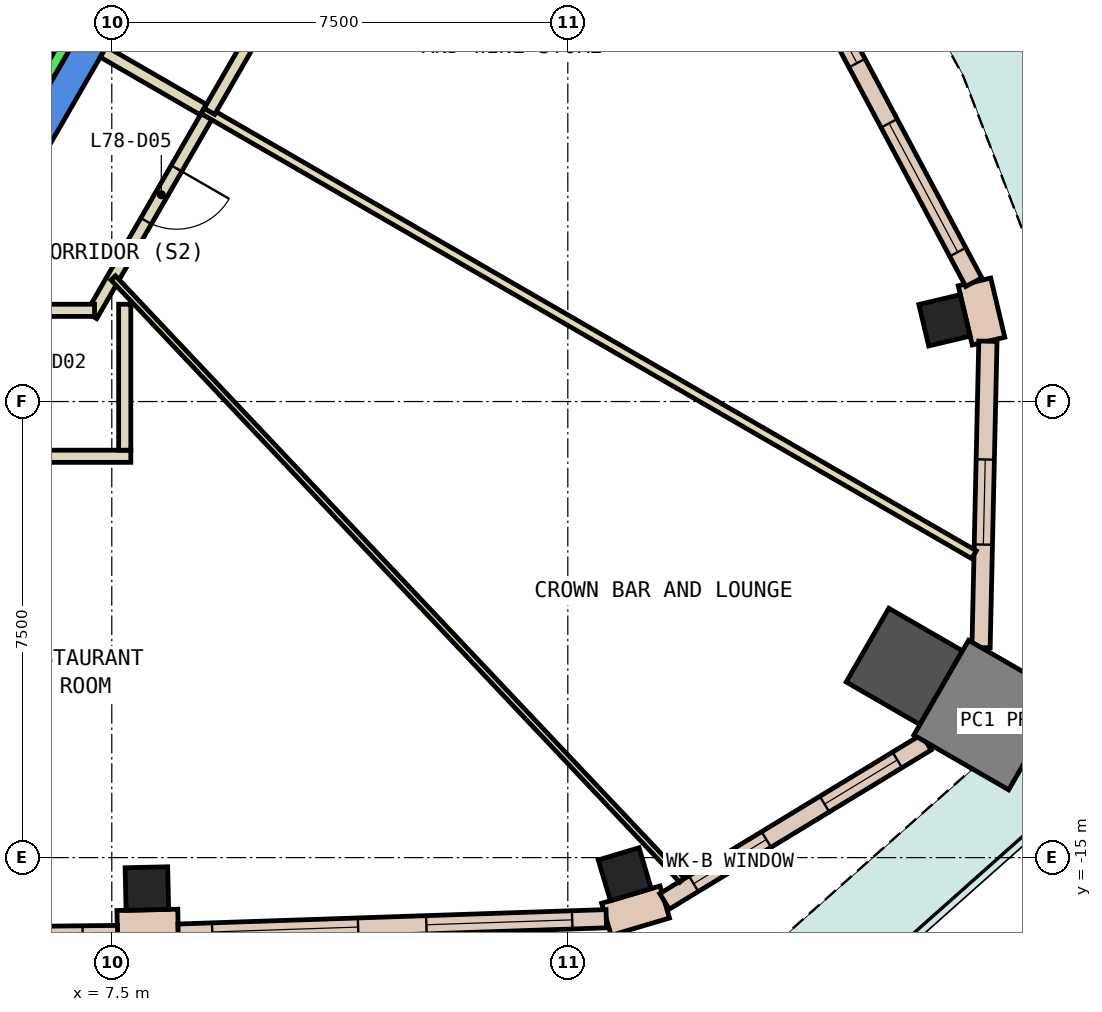
"""IFC4 building model, lengths in metres.
Left out: names, types, materials, properties, quantities, classifications, styles, units other than length and angle.
Written with IfcOpenShell. Run it as: python <this file> out.ifc"""

import sys

from ifc_helpers import new_model, si_unit, direction, frame, frame_2d, origin, origin_2d, place, context, subcontext, project, spatial, polyline, rectangle, outline, extrude, element, fill, save


model = new_model("IFC4")
c1 = context("Model", 3, precision=1e-05, world=origin(), true_north=direction((0.0, 1.0)))
c2 = subcontext(c1, "Body", "Model", "MODEL_VIEW")
j1 = project(units=[si_unit("LENGTHUNIT", "METRE"), si_unit("PLANEANGLEUNIT", "RADIAN")], contexts=[c1])
p1 = place(None, origin())
s1 = spatial("IfcSite", under=j1, at=p1, CompositionType="ELEMENT")
p2 = place(p1, origin())
s2 = spatial("IfcBuilding", under=s1, at=p2, CompositionType="ELEMENT")
p3 = place(p2, frame((0.0, 0.0, 331.4)))
s3 = spatial("IfcBuildingStorey", under=s2, at=p3, CompositionType="ELEMENT", Elevation=331.4)
for number, where, z_axis, x_axis in (
    (1, (8.077, -15.509, 0.0), (0.0, 0.0, 1.0), (1.0, 0.022, 0.0)),
    (2, (15.936, -15.274, 0.0), (0.0, 0.0, 1.0), (0.958, 0.286, 0.0)),
):
    element("IfcColumn", number, at=place(p3, frame(where, z_axis=z_axis, x_axis=x_axis)), inside=s3, PredefinedType="COLUMN", context=c2, shape_type="SweptSolid", body=[
        extrude(rectangle(XDim=0.7, YDim=0.7, at=origin_2d()), origin(), (0.0, 0.0, 1.0), 4.15),
    ])
p4 = place(p3, frame((20.535, -11.856, 0.0), z_axis=(0.0, 0.0, 1.0), x_axis=(-0.866025403784, 0.5, 0.0)))
e3 = element("IfcColumn", 3, at=p4, inside=s3, PredefinedType="COLUMN", context=c2, shape_type="SweptSolid", body=[
    extrude(rectangle(XDim=1.4, YDim=1.4, at=origin_2d()), origin(), (0.0, 0.0, 1.0), 4.15),
])
p5 = place(p3, frame((21.195, -6.164, 0.0), z_axis=(0.0, 0.0, 1.0), x_axis=(-0.2316120761, 0.972808226839, 0.0)))
e4 = element("IfcColumn", 4, at=p5, inside=s3, PredefinedType="COLUMN", context=c2, shape_type="SweptSolid", body=[
    extrude(rectangle(XDim=0.7, YDim=0.7, at=origin_2d()), origin(), (0.0, 0.0, 1.0), 4.15),
])
p6 = place(p3, frame((21.921, -12.656, 0.0), z_axis=(0.0, 0.0, 1.0), x_axis=(-0.866025403784, 0.5, 0.0)))
e5 = element("IfcColumn", 5, at=p6, inside=s3, PredefinedType="COLUMN", context=c2, shape_type="SweptSolid", body=[
    extrude(rectangle(XDim=1.8, YDim=1.8, at=origin_2d()), origin(), (0.0, 0.0, 1.0), 4.15),
])
p7 = place(p3, frame((0.0, 0.0, -0.45)))
e6 = element("IfcWall", 6, at=p7, inside=s3, PredefinedType="SHEAR", context=c2, shape_type="SweptSolid", body=[
    extrude(outline(polyline([(4.907, -6.0), (9.815, 2.5), (9.238, 2.5), (4.619, -5.5), (4.907, -6.0)])), origin(), (0.0, 0.0, 1.0), 4.6),
])
for number, where, z_axis, x_axis in (
    (7, (21.919, -6.506, 0.0), (0.0, 0.0, 1.0), (-0.231, 0.973, 0.0)),
    (8, (7.591, -16.145, 0.0), (0.0, 0.0, 1.0), (1.0, 0.022, 0.0)),
):
    element("IfcWall", number, at=place(p3, frame(where, z_axis=z_axis, x_axis=x_axis)), inside=s3, PredefinedType="STANDARD", context=c2, shape_type="SweptSolid", body=[
        extrude(rectangle(XDim=1.0, YDim=0.55, at=frame_2d((0.5, 0.0))), origin(), (0.0, 0.0, 1.0), 4.15),
    ])
p8 = place(p3, frame((15.635, -16.015, 0.0), z_axis=(0.0, 0.0, 1.0), x_axis=(0.958588587629, 0.284794521834, 0.0)))
e9 = element("IfcWall", 9, at=p8, inside=s3, PredefinedType="STANDARD", context=c2, shape_type="SweptSolid", body=[
    extrude(rectangle(XDim=1.0, YDim=0.55, at=frame_2d((0.5, 0.0))), origin(), (0.0, 0.0, 1.0), 4.15),
])
p9 = place(p3, frame((0.499, -16.344, 0.0), z_axis=(0.0, 0.0, 1.0), x_axis=(0.999937873213, 0.011146735624, 0.0)))
e10 = element("IfcWall", 10, at=p9, inside=s3, PredefinedType="STANDARD", context=c2, shape_type="SweptSolid", body=[
    extrude(rectangle(XDim=7.096, YDim=0.3, at=frame_2d((3.548, 0.0))), origin(), (0.0, 0.0, 1.0), 4.15),
])
p10 = place(p9, frame((0.574, 0.0, 0.9)))
e11 = element("IfcOpeningElement", 11, at=p10, cuts=e10, PredefinedType="OPENING", context=c2, shape_type="SweptSolid", body=[
    extrude(rectangle(XDim=2.4, YDim=3.0, at=frame_2d((1.2, 1.5))), frame((0.0, 0.16, 0.0), z_axis=(0.0, -1.0, 0.0), x_axis=(1.0, 0.0, 0.0)), (0.0, 0.0, 1.0), 0.32),
])
p11 = place(p9, frame((4.122, 0.0, 0.9)))
e12 = element("IfcOpeningElement", 12, at=p11, cuts=e10, PredefinedType="OPENING", context=c2, shape_type="SweptSolid", body=[
    extrude(rectangle(XDim=2.4, YDim=3.0, at=frame_2d((1.2, 1.5))), frame((0.0, 0.16, 0.0), z_axis=(0.0, -1.0, 0.0), x_axis=(1.0, 0.0, 0.0)), (0.0, 0.0, 1.0), 0.32),
])
p12 = place(p3, frame((8.592, -16.242, 0.0), z_axis=(0.0, 0.0, 1.0), x_axis=(0.999433696929, 0.033649449366, 0.0)))
e13 = element("IfcWall", 13, at=p12, inside=s3, PredefinedType="STANDARD", context=c2, shape_type="SweptSolid", body=[
    extrude(rectangle(XDim=7.045, YDim=0.3, at=frame_2d((3.522, 0.0))), origin(), (0.0, 0.0, 1.0), 4.15),
])
p13 = place(p12, frame((0.561, 0.0, 0.9)))
e14 = element("IfcOpeningElement", 14, at=p13, cuts=e13, PredefinedType="OPENING", context=c2, shape_type="SweptSolid", body=[
    extrude(rectangle(XDim=2.4, YDim=3.0, at=frame_2d((1.2, 1.5))), frame((0.0, 0.16, 0.0), z_axis=(0.0, -1.0, 0.0), x_axis=(1.0, 0.0, 0.0)), (0.0, 0.0, 1.0), 0.32),
])
p14 = place(p12, frame((4.084, 0.0, 0.9)))
e15 = element("IfcOpeningElement", 15, at=p14, cuts=e13, PredefinedType="OPENING", context=c2, shape_type="SweptSolid", body=[
    extrude(rectangle(XDim=2.4, YDim=3.0, at=frame_2d((1.2, 1.5))), frame((0.0, 0.16, 0.0), z_axis=(0.0, -1.0, 0.0), x_axis=(1.0, 0.0, 0.0)), (0.0, 0.0, 1.0), 0.32),
])
p15 = place(p3, frame((16.59, -15.72, 0.0), z_axis=(0.0, 0.0, 1.0), x_axis=(0.854607095238, 0.519275180197, 0.0)))
e16 = element("IfcWall", 16, at=p15, inside=s3, PredefinedType="STANDARD", context=c2, shape_type="SweptSolid", body=[
    extrude(rectangle(XDim=5.04, YDim=0.3, at=frame_2d((2.52, 0.0))), origin(), (0.0, 0.0, 1.0), 4.15),
])
p16 = place(p15, frame((0.56, 0.0, 0.9)))
e17 = element("IfcOpeningElement", 17, at=p16, cuts=e16, PredefinedType="OPENING", context=c2, shape_type="SweptSolid", body=[
    extrude(rectangle(XDim=1.4, YDim=3.0, at=frame_2d((0.7, 1.5))), frame((0.0, 0.16, 0.0), z_axis=(0.0, -1.0, 0.0), x_axis=(1.0, 0.0, 0.0)), (0.0, 0.0, 1.0), 0.32),
])
p17 = place(p15, frame((3.08, 0.0, 0.9)))
e18 = element("IfcOpeningElement", 18, at=p17, cuts=e16, PredefinedType="OPENING", context=c2, shape_type="SweptSolid", body=[
    extrude(rectangle(XDim=1.4, YDim=3.0, at=frame_2d((0.7, 1.5))), frame((0.0, 0.16, 0.0), z_axis=(0.0, -1.0, 0.0), x_axis=(1.0, 0.0, 0.0)), (0.0, 0.0, 1.0), 0.32),
])
p18 = place(p3, frame((21.796, -11.546, 0.0), z_axis=(0.0, 0.0, 1.0), x_axis=(0.022431960078, 0.999748371925, 0.0)))
e19 = element("IfcWall", 19, at=p18, inside=s3, PredefinedType="STANDARD", context=c2, shape_type="SweptSolid", body=[
    extrude(rectangle(XDim=5.039, YDim=0.3, at=frame_2d((2.52, 0.0))), origin(), (0.0, 0.0, 1.0), 4.15),
])
p19 = place(p18, frame((1.694, 0.0, 0.9)))
e20 = element("IfcOpeningElement", 20, at=p19, cuts=e19, PredefinedType="OPENING", context=c2, shape_type="SweptSolid", body=[
    extrude(rectangle(XDim=1.4, YDim=3.0, at=frame_2d((0.7, 1.5))), frame((0.0, 0.16, 0.0), z_axis=(0.0, -1.0, 0.0), x_axis=(1.0, 0.0, 0.0)), (0.0, 0.0, 1.0), 0.32),
])
p20 = place(p3, frame((21.677, -5.537, 0.0), z_axis=(0.0, 0.0, 1.0), x_axis=(-0.470447918342, 0.882427762555, 0.0)))
e21 = element("IfcWall", 21, at=p20, inside=s3, PredefinedType="STANDARD", context=c2, shape_type="SweptSolid", body=[
    extrude(rectangle(XDim=7.044, YDim=0.3, at=frame_2d((3.522, 0.0))), origin(), (0.0, 0.0, 1.0), 4.15),
])
p21 = place(p20, frame((0.561, 0.0, 0.9)))
e22 = element("IfcOpeningElement", 22, at=p21, cuts=e21, PredefinedType="OPENING", context=c2, shape_type="SweptSolid", body=[
    extrude(rectangle(XDim=2.4, YDim=3.0, at=frame_2d((1.2, 1.5))), frame((0.0, 0.16, 0.0), z_axis=(0.0, -1.0, 0.0), x_axis=(1.0, 0.0, 0.0)), (0.0, 0.0, 1.0), 0.32),
])
p22 = place(p20, frame((4.083, 0.0, 0.9)))
e23 = element("IfcOpeningElement", 23, at=p22, cuts=e21, PredefinedType="OPENING", context=c2, shape_type="SweptSolid", body=[
    extrude(rectangle(XDim=2.4, YDim=3.0, at=frame_2d((1.2, 1.5))), frame((0.0, 0.16, 0.0), z_axis=(0.0, -1.0, 0.0), x_axis=(1.0, 0.0, 0.0)), (0.0, 0.0, 1.0), 0.32),
])
p23 = place(p3, frame((7.813, -8.4, 0.0), z_axis=(0.0, 0.0, 1.0), x_axis=(-1.0, 0.0, 0.0)))
e24 = element("IfcWall", 24, at=p23, inside=s3, PredefinedType="PARTITIONING", context=c2, shape_type="SweptSolid", body=[
    extrude(rectangle(XDim=5.671, YDim=0.2, at=frame_2d((2.835, 0.0))), origin(), (0.0, 0.0, 1.0), 4.15),
])
p24 = place(p23, frame((2.441, 0.0, 0.0)))
e25 = element("IfcOpeningElement", 25, at=p24, cuts=e24, PredefinedType="OPENING", context=c2, shape_type="SweptSolid", body=[
    extrude(rectangle(XDim=1.0, YDim=2.1, at=frame_2d((0.5, 1.05))), frame((0.0, 0.11, 0.0), z_axis=(0.0, -1.0, 0.0), x_axis=(1.0, 0.0, 0.0)), (0.0, 0.0, 1.0), 0.22),
])
p25 = place(p3, frame((7.713, -5.9, 0.0), z_axis=(0.0, 0.0, 1.0), x_axis=(0.0, -1.0, 0.0)))
e26 = element("IfcWall", 26, at=p25, inside=s3, PredefinedType="PARTITIONING", context=c2, shape_type="SweptSolid", body=[
    extrude(rectangle(XDim=2.4, YDim=0.2, at=frame_2d((1.2, 0.0))), origin(), (0.0, 0.0, 1.0), 4.15),
])
p26 = place(p3, frame((9.106, -2.728, 0.0), z_axis=(0.0, 0.0, 1.0), x_axis=(-0.500132879116, -0.865948672398, 0.0)))
e27 = element("IfcWall", 27, at=p26, inside=s3, PredefinedType="PARTITIONING", context=c2, shape_type="SweptSolid", body=[
    extrude(rectangle(XDim=3.879, YDim=0.2, at=frame_2d((1.939, 0.0))), origin(), (0.0, 0.0, 1.0), 4.15),
])
p27 = place(p26, frame((1.083, 0.0, 0.0)))
e28 = element("IfcOpeningElement", 28, at=p27, cuts=e27, PredefinedType="OPENING", context=c2, shape_type="SweptSolid", body=[
    extrude(rectangle(XDim=1.0, YDim=2.1, at=frame_2d((0.5, 1.05))), frame((0.0, 0.11, 0.0), z_axis=(0.0, -1.0, 0.0), x_axis=(1.0, 0.0, 0.0)), (0.0, 0.0, 1.0), 0.22),
])
p28 = place(p3, frame((7.361, -1.75, 0.0), z_axis=(0.0, 0.0, 1.0), x_axis=(0.865980106173, -0.500078449558, 0.0)))
e29 = element("IfcWall", 29, at=p28, inside=s3, PredefinedType="PARTITIONING", context=c2, shape_type="SweptSolid", body=[
    extrude(rectangle(XDim=1.9, YDim=0.2, at=frame_2d((0.95, 0.0))), origin(), (0.0, 0.0, 1.0), 4.15),
])
p29 = place(p3, frame((7.524, -5.467, 0.0), z_axis=(0.0, 0.0, 1.0), x_axis=(0.686666158826, -0.726972892427, 0.0)))
e30 = element("IfcWall", 30, at=p29, inside=s3, PredefinedType="PARTITIONING", context=c2, shape_type="SweptSolid", body=[
    extrude(rectangle(XDim=13.622, YDim=0.1, at=frame_2d((6.811, 0.0))), origin(), (0.0, 0.0, 1.0), 4.15),
])
p30 = place(p3, frame((9.006, -2.7, 0.0), z_axis=(0.0, 0.0, 1.0), x_axis=(0.865999449672, -0.500044951147, 0.0)))
e31 = element("IfcWall", 31, at=p30, inside=s3, PredefinedType="PARTITIONING", context=c2, shape_type="SweptSolid", body=[
    extrude(rectangle(XDim=14.635, YDim=0.15, at=frame_2d((7.317, 0.0))), origin(), (0.0, 0.0, 1.0), 4.15),
])
p31 = place(p3, frame((12.074, 2.413, 0.0), z_axis=(0.0, 0.0, 1.0), x_axis=(-0.499974029402, -0.866040397397, 0.0)))
e32 = element("IfcWall", 32, at=p31, inside=s3, PredefinedType="PARTITIONING", context=c2, shape_type="SweptSolid", body=[
    extrude(rectangle(XDim=5.936, YDim=0.2, at=frame_2d((2.968, 0.0))), origin(), (0.0, 0.0, 1.0), 4.15),
])
p32 = place(p3, frame((5.076, -6.0, 0.0), z_axis=(0.0, 0.0, 1.0), x_axis=(1.0, 0.0, 0.0)))
e33 = element("IfcWall", 33, at=p32, inside=s3, PredefinedType="PARTITIONING", context=c2, shape_type="SweptSolid", body=[
    extrude(rectangle(XDim=2.14, YDim=0.2, at=frame_2d((1.07, 0.0))), origin(), (0.0, 0.0, 1.0), 4.15),
])
p33 = place(p32, frame((0.336, 0.0, 0.0)))
e34 = element("IfcOpeningElement", 34, at=p33, cuts=e33, PredefinedType="OPENING", context=c2, shape_type="SweptSolid", body=[
    extrude(rectangle(XDim=1.0, YDim=2.1, at=frame_2d((0.5, 1.05))), frame((0.0, 0.11, 0.0), z_axis=(0.0, -1.0, 0.0), x_axis=(1.0, 0.0, 0.0)), (0.0, 0.0, 1.0), 0.22),
])
p34 = place(p3, frame((5.492, -3.788, 0.0), z_axis=(0.0, 0.0, 1.0), x_axis=(0.500034260056, 0.866005622828, 0.0)))
e35 = element("IfcWall", 35, at=p34, inside=s3, PredefinedType="STANDARD", context=c2, shape_type="SweptSolid", body=[
    extrude(rectangle(XDim=5.399, YDim=0.2, at=frame_2d((2.7, 0.0))), origin(), (0.0, 0.0, 1.0), 4.15),
])
p35 = place(p13, origin())
e36 = element("IfcWindow", 36, at=p35, inside=s3, PartitioningType="SINGLE_PANEL", PredefinedType="WINDOW", context=c2, shape_type="SweptSolid", body=[
    extrude(rectangle(XDim=2.4, YDim=3.0, at=frame_2d((1.2, 1.5))), frame((0.0, 0.03, 0.0), z_axis=(0.0, -1.0, 0.0), x_axis=(1.0, 0.0, 0.0)), (0.0, 0.0, 1.0), 0.06),
])
fill(e14, e36)
p36 = place(p14, origin())
e37 = element("IfcWindow", 37, at=p36, inside=s3, PartitioningType="SINGLE_PANEL", PredefinedType="WINDOW", context=c2, shape_type="SweptSolid", body=[
    extrude(rectangle(XDim=2.4, YDim=3.0, at=frame_2d((1.2, 1.5))), frame((0.0, 0.03, 0.0), z_axis=(0.0, -1.0, 0.0), x_axis=(1.0, 0.0, 0.0)), (0.0, 0.0, 1.0), 0.06),
])
fill(e15, e37)
p37 = place(p16, origin())
e38 = element("IfcWindow", 38, at=p37, inside=s3, PartitioningType="SINGLE_PANEL", PredefinedType="WINDOW", context=c2, shape_type="SweptSolid", body=[
    extrude(rectangle(XDim=1.4, YDim=3.0, at=frame_2d((0.7, 1.5))), frame((0.0, 0.03, 0.0), z_axis=(0.0, -1.0, 0.0), x_axis=(1.0, 0.0, 0.0)), (0.0, 0.0, 1.0), 0.06),
])
fill(e17, e38)
p38 = place(p17, origin())
e39 = element("IfcWindow", 39, at=p38, inside=s3, PartitioningType="SINGLE_PANEL", PredefinedType="WINDOW", context=c2, shape_type="SweptSolid", body=[
    extrude(rectangle(XDim=1.4, YDim=3.0, at=frame_2d((0.7, 1.5))), frame((0.0, 0.03, 0.0), z_axis=(0.0, -1.0, 0.0), x_axis=(1.0, 0.0, 0.0)), (0.0, 0.0, 1.0), 0.06),
])
fill(e18, e39)
p39 = place(p19, origin())
e40 = element("IfcWindow", 40, at=p39, inside=s3, PartitioningType="SINGLE_PANEL", PredefinedType="WINDOW", context=c2, shape_type="SweptSolid", body=[
    extrude(rectangle(XDim=1.4, YDim=3.0, at=frame_2d((0.7, 1.5))), frame((0.0, 0.03, 0.0), z_axis=(0.0, -1.0, 0.0), x_axis=(1.0, 0.0, 0.0)), (0.0, 0.0, 1.0), 0.06),
])
fill(e20, e40)
p40 = place(p21, origin())
e41 = element("IfcWindow", 41, at=p40, inside=s3, PartitioningType="SINGLE_PANEL", PredefinedType="WINDOW", context=c2, shape_type="SweptSolid", body=[
    extrude(rectangle(XDim=2.4, YDim=3.0, at=frame_2d((1.2, 1.5))), frame((0.0, 0.03, 0.0), z_axis=(0.0, -1.0, 0.0), x_axis=(1.0, 0.0, 0.0)), (0.0, 0.0, 1.0), 0.06),
])
fill(e22, e41)
p41 = place(p22, origin())
e42 = element("IfcWindow", 42, at=p41, inside=s3, PartitioningType="SINGLE_PANEL", PredefinedType="WINDOW", context=c2, shape_type="SweptSolid", body=[
    extrude(rectangle(XDim=2.4, YDim=3.0, at=frame_2d((1.2, 1.5))), frame((0.0, 0.03, 0.0), z_axis=(0.0, -1.0, 0.0), x_axis=(1.0, 0.0, 0.0)), (0.0, 0.0, 1.0), 0.06),
])
fill(e23, e42)
p42 = place(p27, origin())
e43 = element("IfcDoor", 43, at=p42, inside=s3, OperationType="SINGLE_SWING_LEFT", PredefinedType="DOOR", context=c2, shape_type="SweptSolid", body=[
    extrude(rectangle(XDim=1.0, YDim=2.1, at=frame_2d((0.5, 1.05))), frame((0.0, 0.025, 0.0), z_axis=(0.0, -1.0, 0.0), x_axis=(1.0, 0.0, 0.0)), (0.0, 0.0, 1.0), 0.05),
])
fill(e28, e43)
save(model, sys.argv[1])
